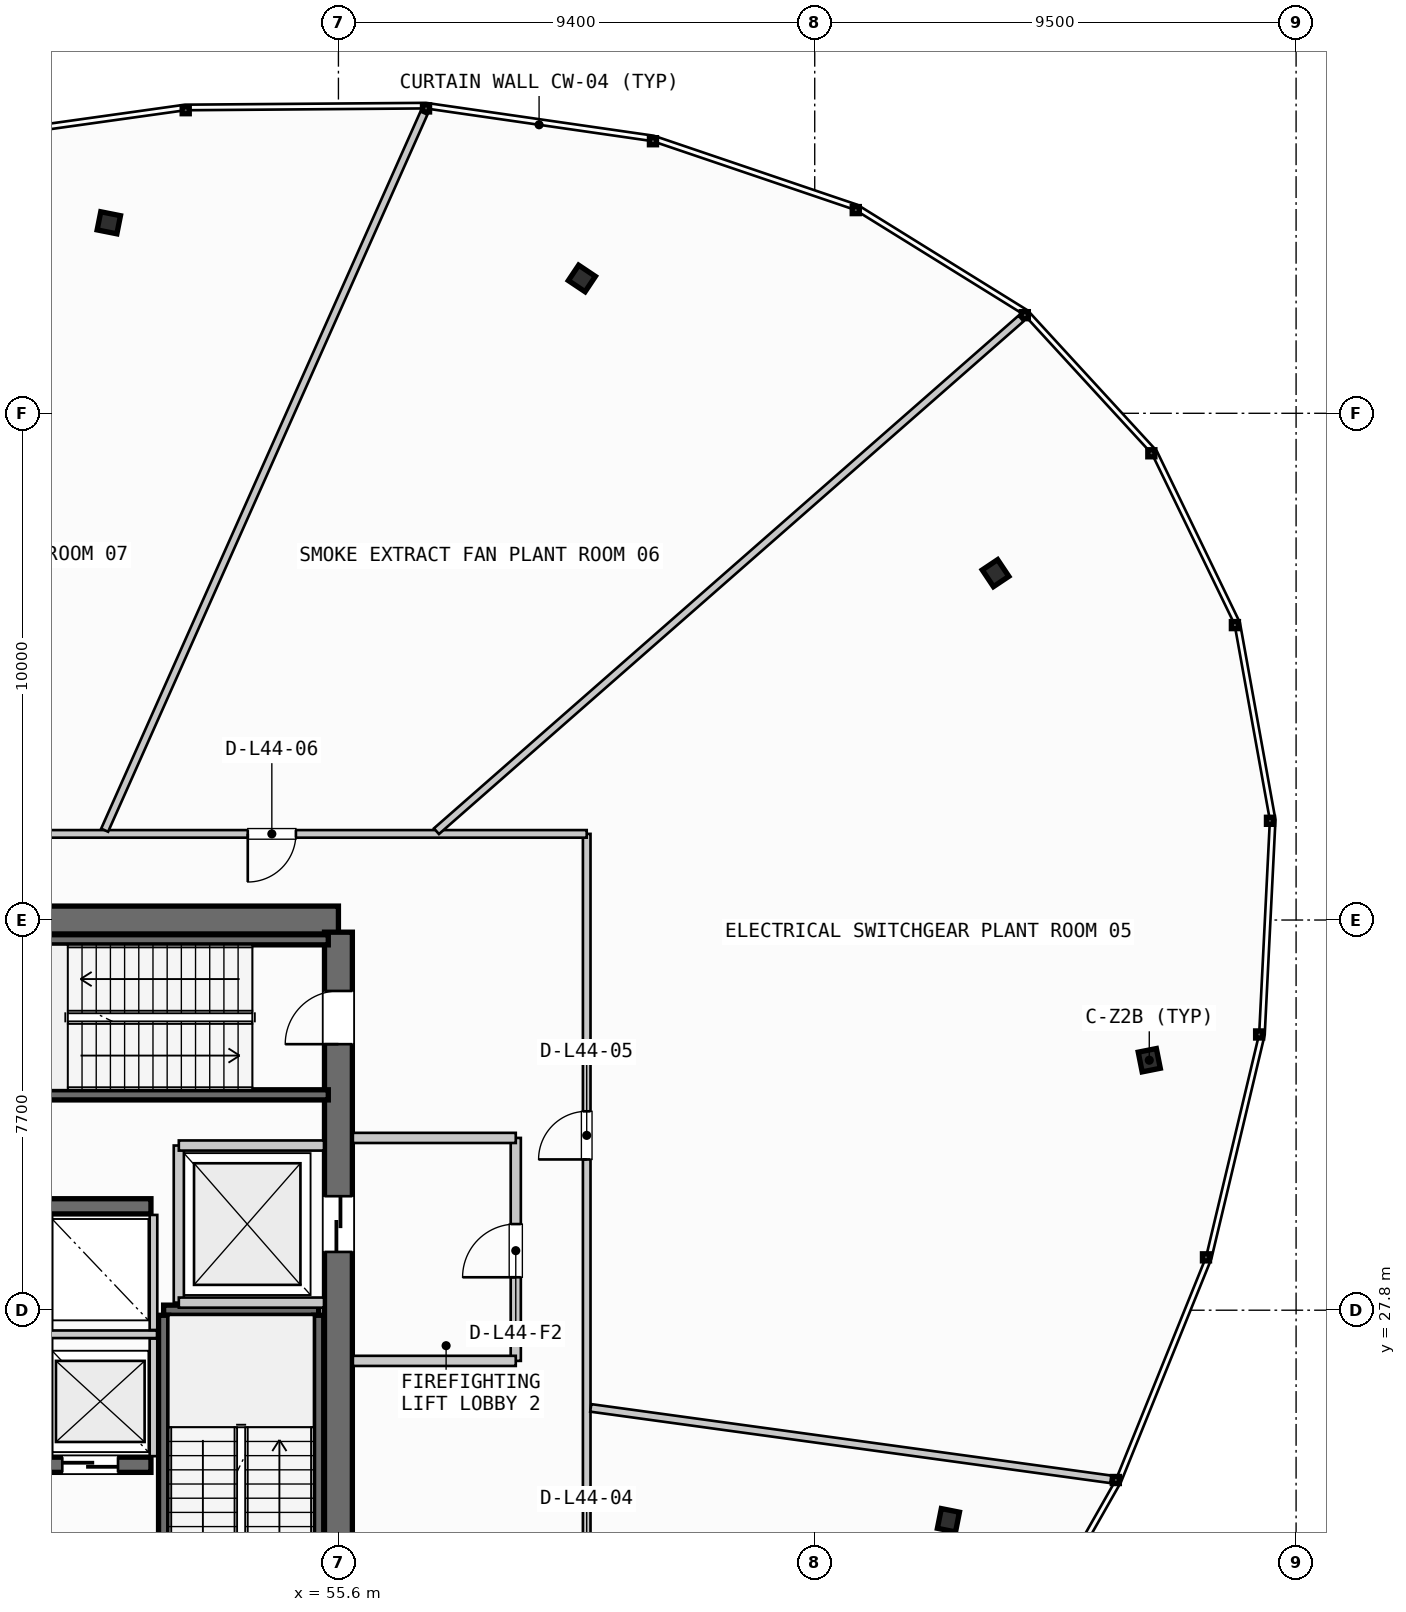
"""IFC4 building model, lengths in metres.
Left out: names, types, materials, properties, quantities, classifications, styles, units other than length and angle.
Written with IfcOpenShell. Run it as: python <this file> out.ifc"""

import sys

from ifc_helpers import new_model, si_unit, direction, frame, frame_2d, origin, origin_2d, place, context, subcontext, project, spatial, rectangle, i_section, extrude, source, transform, mapped, element, fill, save


model = new_model("IFC4")
c1 = context("Model", 3, precision=1e-05, world=origin(), true_north=direction((0.0, 1.0)))
c2 = subcontext(c1, "Body", "Model", "MODEL_VIEW")
j1 = project(units=[si_unit("LENGTHUNIT", "METRE"), si_unit("PLANEANGLEUNIT", "RADIAN")], contexts=[c1])
p1 = place(None, origin())
s1 = spatial("IfcSite", under=j1, at=p1, CompositionType="ELEMENT")
p2 = place(p1, origin())
s2 = spatial("IfcBuilding", under=s1, at=p2, CompositionType="ELEMENT")
p3 = place(p2, frame((0.0, 0.0, 171.4)))
s3 = spatial("IfcBuildingStorey", under=s2, at=p3, CompositionType="ELEMENT", Elevation=171.4)
p4 = place(p3, frame((55.6, 35.5, 0.0), z_axis=(0.0, 0.0, 1.0), x_axis=(-1.0, 0.0, 0.0)))
e1 = element("IfcWall", 1, at=p4, inside=s3, PredefinedType="SHEAR", context=c2, shape_type="SweptSolid", body=[
    extrude(rectangle(XDim=17.6, YDim=0.55, at=frame_2d((8.8, 0.0))), origin(), (0.0, 0.0, 1.0), 4.58),
])
p5 = place(p4, frame((8.05, 0.0, 0.0)))
e2 = element("IfcOpeningElement", 2, at=p5, cuts=e1, PredefinedType="OPENING", context=c2, shape_type="SweptSolid", body=[
    extrude(rectangle(XDim=1.5, YDim=2.2, at=frame_2d((0.75, 1.1))), frame((0.0, 0.285, 0.0), z_axis=(0.0, -1.0, 0.0), x_axis=(1.0, 0.0, 0.0)), (0.0, 0.0, 1.0), 0.57),
])
p6 = place(p4, frame((12.9, 0.0, 0.0)))
e3 = element("IfcOpeningElement", 3, at=p6, cuts=e1, PredefinedType="OPENING", context=c2, shape_type="SweptSolid", body=[
    extrude(rectangle(XDim=0.9, YDim=2.15, at=frame_2d((0.45, 1.075))), frame((0.0, 0.285, 0.0), z_axis=(0.0, -1.0, 0.0), x_axis=(1.0, 0.0, 0.0)), (0.0, 0.0, 1.0), 0.57),
])
p7 = place(p4, frame((10.6, 0.0, 0.0)))
e4 = element("IfcOpeningElement", 4, at=p7, cuts=e1, PredefinedType="OPENING", context=c2, shape_type="SweptSolid", body=[
    extrude(rectangle(XDim=0.95, YDim=2.15, at=frame_2d((0.475, 1.075))), frame((0.0, 0.285, 0.0), z_axis=(0.0, -1.0, 0.0), x_axis=(1.0, 0.0, 0.0)), (0.0, 0.0, 1.0), 0.57),
])
p8 = place(p3, frame((55.6, 20.34, 0.0), z_axis=(0.0, 0.0, 1.0), x_axis=(0.0, 1.0, 0.0)))
e5 = element("IfcWall", 5, at=p8, inside=s3, PredefinedType="SHEAR", context=c2, shape_type="SweptSolid", body=[
    extrude(rectangle(XDim=14.92, YDim=0.55, at=frame_2d((7.46, 0.0))), origin(), (0.0, 0.0, 1.0), 4.58),
])
p9 = place(p8, frame((12.71, 0.0, 0.0)))
e6 = element("IfcOpeningElement", 6, at=p9, cuts=e5, PredefinedType="OPENING", context=c2, shape_type="SweptSolid", body=[
    extrude(rectangle(XDim=1.05, YDim=2.15, at=frame_2d((0.525, 1.075))), frame((0.0, 0.285, 0.0), z_axis=(0.0, -1.0, 0.0), x_axis=(1.0, 0.0, 0.0)), (0.0, 0.0, 1.0), 0.57),
])
p10 = place(p8, frame((8.61, 0.0, 0.0)))
e7 = element("IfcOpeningElement", 7, at=p10, cuts=e5, PredefinedType="OPENING", context=c2, shape_type="SweptSolid", body=[
    extrude(rectangle(XDim=1.1, YDim=2.2, at=frame_2d((0.55, 1.1))), frame((0.0, 0.285, 0.0), z_axis=(0.0, -1.0, 0.0), x_axis=(1.0, 0.0, 0.0)), (0.0, 0.0, 1.0), 0.57),
])
p11 = place(p3, frame((47.65, 24.75, 0.0), z_axis=(0.0, 0.0, 1.0), x_axis=(1.0, 0.0, 0.0)))
e8 = element("IfcWall", 8, at=p11, inside=s3, PredefinedType="SHEAR", context=c2, shape_type="SweptSolid", body=[
    extrude(rectangle(XDim=4.25, YDim=0.3, at=frame_2d((2.125, 0.0))), origin(), (0.0, 0.0, 1.0), 4.58),
])
p12 = place(p11, frame((0.45, 0.0, 0.0)))
e9 = element("IfcOpeningElement", 9, at=p12, cuts=e8, PredefinedType="OPENING", context=c2, shape_type="SweptSolid", body=[
    extrude(rectangle(XDim=1.1, YDim=2.2, at=frame_2d((0.55, 1.1))), frame((0.0, 0.16, 0.0), z_axis=(0.0, -1.0, 0.0), x_axis=(1.0, 0.0, 0.0)), (0.0, 0.0, 1.0), 0.32),
])
p13 = place(p11, frame((2.5, 0.0, 0.0)))
e10 = element("IfcOpeningElement", 10, at=p13, cuts=e8, PredefinedType="OPENING", context=c2, shape_type="SweptSolid", body=[
    extrude(rectangle(XDim=1.1, YDim=2.2, at=frame_2d((0.55, 1.1))), frame((0.0, 0.16, 0.0), z_axis=(0.0, -1.0, 0.0), x_axis=(1.0, 0.0, 0.0)), (0.0, 0.0, 1.0), 0.32),
])
p14 = place(p3, frame((47.65, 29.85, 0.0), z_axis=(0.0, 0.0, 1.0), x_axis=(1.0, 0.0, 0.0)))
e11 = element("IfcWall", 11, at=p14, inside=s3, PredefinedType="SHEAR", context=c2, shape_type="SweptSolid", body=[
    extrude(rectangle(XDim=4.25, YDim=0.3, at=frame_2d((2.125, 0.0))), origin(), (0.0, 0.0, 1.0), 4.58),
])
m1 = source(origin(), c2, "Body", "SweptSolid", [
    extrude(i_section(OverallWidth=0.397, OverallDepth=0.365, WebThickness=0.028, FlangeThickness=0.044, FilletRadius=0.015, at=origin_2d()), origin(), (0.0, 0.0, 1.0), 4.58),
])
for number, where, z_axis, x_axis in (
    (12, (71.603, 32.733, 0.0), (0.0, 0.0, 1.0), (0.981, 0.195, 0.0)),
    (13, (68.569, 42.345, 0.0), (0.0, 0.0, 1.0), (0.831, 0.556, 0.0)),
    (14, (60.405, 48.161, 0.0), (0.0, 0.0, 1.0), (0.556, 0.831, 0.0)),
    (15, (51.069, 49.259, 0.0), (0.0, 0.0, 1.0), (0.195, 0.981, 0.0)),
    (16, (67.639, 23.655, 0.0), (0.0, 0.0, 1.0), (0.981, -0.195, 0.0)),
):
    element("IfcColumn", number, at=place(p3, frame(where, z_axis=z_axis, x_axis=x_axis)), inside=s3, PredefinedType="COLUMN", context=c2, shape_type="MappedRepresentation", body=[
        mapped(m1, transform((0.0, 0.0, 0.0), scale=1.0)),
    ])
p15 = place(p3, frame((52.15, 27.8, 0.0), z_axis=(0.0, 0.0, 1.0), x_axis=(1.0, 0.0, 0.0)))
e17 = element("IfcWall", 17, at=p15, inside=s3, PredefinedType="SHEAR", context=c2, shape_type="SweptSolid", body=[
    extrude(rectangle(XDim=3.06, YDim=0.2, at=frame_2d((1.53, 0.0))), origin(), (0.0, 0.0, 1.0), 4.58),
])
for number, where, z_axis, x_axis in (
    (18, (55.21, 27.7, 0.0), (0.0, 0.0, 1.0), (0.0, -1.0, 0.0)),
    (19, (52.15, 20.35, 0.0), (0.0, 0.0, 1.0), (0.0, 1.0, 0.0)),
    (20, (48.05, 35.11, 0.0), (0.0, 0.0, 1.0), (1.0, 0.0, 0.0)),
    (21, (55.4, 32.05, 0.0), (0.0, 0.0, 1.0), (-1.0, 0.0, 0.0)),
):
    element("IfcWall", number, at=place(p3, frame(where, z_axis=z_axis, x_axis=x_axis)), inside=s3, PredefinedType="SHEAR", context=c2, shape_type="SweptSolid", body=[
        extrude(rectangle(XDim=7.35, YDim=0.2, at=frame_2d((3.675, 0.0))), origin(), (0.0, 0.0, 1.0), 4.58),
    ])
p16 = place(p3, frame((52.45, 27.95, 0.0), z_axis=(0.0, 0.0, 1.0), x_axis=(0.0, 1.0, 0.0)))
e22 = element("IfcWall", 22, at=p16, inside=s3, PredefinedType="PARTITIONING", context=c2, shape_type="SweptSolid", body=[
    extrude(rectangle(XDim=3.1, YDim=0.2, at=frame_2d((1.55, 0.0))), origin(), (0.0, 0.0, 1.0), 2.355),
])
for number, where, z_axis, x_axis in (
    (23, (52.45, 27.95, 0.0), (0.0, 0.0, 1.0), (1.0, 0.0, 0.0)),
    (24, (52.45, 31.05, 0.0), (0.0, 0.0, 1.0), (1.0, 0.0, 0.0)),
):
    element("IfcWall", number, at=place(p3, frame(where, z_axis=z_axis, x_axis=x_axis)), inside=s3, PredefinedType="PARTITIONING", context=c2, shape_type="SweptSolid", body=[
        extrude(rectangle(XDim=2.865, YDim=0.2, at=frame_2d((1.433, 0.0))), origin(), (0.0, 0.0, 1.0), 2.355),
    ])
p17 = place(p3, frame((59.1, 26.8, 0.0), z_axis=(0.0, 0.0, 1.0), x_axis=(0.0, 1.0, 0.0)))
e25 = element("IfcWall", 25, at=p17, inside=s3, PredefinedType="PARTITIONING", context=c2, shape_type="SweptSolid", body=[
    extrude(rectangle(XDim=4.4, YDim=0.2, at=frame_2d((2.2, 0.0))), origin(), (0.0, 0.0, 1.0), 2.355),
])
p18 = place(p17, frame((1.65, 0.0, 0.0)))
e26 = element("IfcOpeningElement", 26, at=p18, cuts=e25, PredefinedType="OPENING", context=c2, shape_type="SweptSolid", body=[
    extrude(rectangle(XDim=1.05, YDim=2.15, at=frame_2d((0.525, 1.075))), frame((0.0, 0.11, 0.0), z_axis=(0.0, -1.0, 0.0), x_axis=(1.0, 0.0, 0.0)), (0.0, 0.0, 1.0), 0.22),
])
for number, where, z_axis, x_axis in (
    (27, (55.885, 26.8, 0.0), (0.0, 0.0, 1.0), (1.0, 0.0, 0.0)),
    (28, (55.885, 31.2, 0.0), (0.0, 0.0, 1.0), (1.0, 0.0, 0.0)),
):
    element("IfcWall", number, at=place(p3, frame(where, z_axis=z_axis, x_axis=x_axis)), inside=s3, PredefinedType="PARTITIONING", context=c2, shape_type="SweptSolid", body=[
        extrude(rectangle(XDim=3.215, YDim=0.2, at=frame_2d((1.607, 0.0))), origin(), (0.0, 0.0, 1.0), 2.355),
    ])
p19 = place(p3, frame((47.7, 27.325, 0.0), z_axis=(0.0, 0.0, 1.0), x_axis=(1.0, 0.0, 0.0)))
e29 = element("IfcWall", 29, at=p19, inside=s3, PredefinedType="PARTITIONING", context=c2, shape_type="SweptSolid", body=[
    extrude(rectangle(XDim=4.32, YDim=0.15, at=frame_2d((2.16, 0.0))), origin(), (0.0, 0.0, 1.0), 2.355),
])
p20 = place(p3, frame((51.95, 24.92, 0.0), z_axis=(0.0, 0.0, 1.0), x_axis=(0.0, 1.0, 0.0)))
e30 = element("IfcWall", 30, at=p20, inside=s3, PredefinedType="PARTITIONING", context=c2, shape_type="SweptSolid", body=[
    extrude(rectangle(XDim=2.32, YDim=0.15, at=frame_2d((1.16, 0.0))), origin(), (0.0, 0.0, 1.0), 2.355),
])
p21 = place(p3, frame((51.95, 27.41, 0.0), z_axis=(0.0, 0.0, 1.0), x_axis=(0.0, 1.0, 0.0)))
e31 = element("IfcWall", 31, at=p21, inside=s3, PredefinedType="PARTITIONING", context=c2, shape_type="SweptSolid", body=[
    extrude(rectangle(XDim=2.27, YDim=0.15, at=frame_2d((1.135, 0.0))), origin(), (0.0, 0.0, 1.0), 2.355),
])
p22 = place(p3, frame((60.5, 18.4, 0.0), z_axis=(0.0, 0.0, 1.0), x_axis=(0.0, 1.0, 0.0)))
e32 = element("IfcWall", 32, at=p22, inside=s3, PredefinedType="PARTITIONING", context=c2, shape_type="SweptSolid", body=[
    extrude(rectangle(XDim=18.8, YDim=0.15, at=frame_2d((9.4, 0.0))), origin(), (0.0, 0.0, 1.0), 2.355),
])
p23 = place(p22, frame((3.556, 0.0, 0.0)))
e33 = element("IfcOpeningElement", 33, at=p23, cuts=e32, PredefinedType="OPENING", context=c2, shape_type="SweptSolid", body=[
    extrude(rectangle(XDim=0.95, YDim=2.15, at=frame_2d((0.475, 1.075))), frame((0.0, 0.085, 0.0), z_axis=(0.0, -1.0, 0.0), x_axis=(1.0, 0.0, 0.0)), (0.0, 0.0, 1.0), 0.17),
])
p24 = place(p22, frame((12.375, 0.0, 0.0)))
e34 = element("IfcOpeningElement", 34, at=p24, cuts=e32, PredefinedType="OPENING", context=c2, shape_type="SweptSolid", body=[
    extrude(rectangle(XDim=0.95, YDim=2.15, at=frame_2d((0.475, 1.075))), frame((0.0, 0.085, 0.0), z_axis=(0.0, -1.0, 0.0), x_axis=(1.0, 0.0, 0.0)), (0.0, 0.0, 1.0), 0.17),
])
p25 = place(p3, frame((60.5, 37.2, 0.0), z_axis=(0.0, 0.0, 1.0), x_axis=(-1.0, 0.0, 0.0)))
e35 = element("IfcWall", 35, at=p25, inside=s3, PredefinedType="PARTITIONING", context=c2, shape_type="SweptSolid", body=[
    extrude(rectangle(XDim=27.4, YDim=0.15, at=frame_2d((13.7, 0.0))), origin(), (0.0, 0.0, 1.0), 2.355),
])
p26 = place(p25, frame((5.739, 0.0, 0.0)))
e36 = element("IfcOpeningElement", 36, at=p26, cuts=e35, PredefinedType="OPENING", context=c2, shape_type="SweptSolid", body=[
    extrude(rectangle(XDim=0.95, YDim=2.15, at=frame_2d((0.475, 1.075))), frame((0.0, 0.085, 0.0), z_axis=(0.0, -1.0, 0.0), x_axis=(1.0, 0.0, 0.0)), (0.0, 0.0, 1.0), 0.17),
])
p27 = place(p25, frame((13.038, 0.0, 0.0)))
e37 = element("IfcOpeningElement", 37, at=p27, cuts=e35, PredefinedType="OPENING", context=c2, shape_type="SweptSolid", body=[
    extrude(rectangle(XDim=0.95, YDim=2.15, at=frame_2d((0.475, 1.075))), frame((0.0, 0.085, 0.0), z_axis=(0.0, -1.0, 0.0), x_axis=(1.0, 0.0, 0.0)), (0.0, 0.0, 1.0), 0.17),
])
p28 = place(p25, frame((20.105, 0.0, 0.0)))
e38 = element("IfcOpeningElement", 38, at=p28, cuts=e35, PredefinedType="OPENING", context=c2, shape_type="SweptSolid", body=[
    extrude(rectangle(XDim=0.95, YDim=2.15, at=frame_2d((0.475, 1.075))), frame((0.0, 0.085, 0.0), z_axis=(0.0, -1.0, 0.0), x_axis=(1.0, 0.0, 0.0)), (0.0, 0.0, 1.0), 0.17),
])
p29 = place(p3, frame((60.579, 25.872, 0.0), z_axis=(0.0, 0.0, 1.0), x_axis=(0.990702675866, -0.136044875066, 0.0)))
e39 = element("IfcWall", 39, at=p29, inside=s3, PredefinedType="PARTITIONING", context=c2, shape_type="SweptSolid", body=[
    extrude(rectangle(XDim=10.36, YDim=0.15, at=frame_2d((5.18, 0.0))), origin(), (0.0, 0.0, 1.0), 2.355),
])
p30 = place(p3, frame((57.534, 37.253, 0.0), z_axis=(0.0, 0.0, 1.0), x_axis=(0.751830096588, 0.659356888085, 0.0)))
e40 = element("IfcWall", 40, at=p30, inside=s3, PredefinedType="PARTITIONING", context=c2, shape_type="SweptSolid", body=[
    extrude(rectangle(XDim=15.344, YDim=0.15, at=frame_2d((7.672, 0.0))), origin(), (0.0, 0.0, 1.0), 2.355),
])
p31 = place(p3, frame((50.986, 37.273, 0.0), z_axis=(0.0, 0.0, 1.0), x_axis=(0.406800747022, 0.913516914032, 0.0)))
e41 = element("IfcWall", 41, at=p31, inside=s3, PredefinedType="PARTITIONING", context=c2, shape_type="SweptSolid", body=[
    extrude(rectangle(XDim=15.492, YDim=0.15, at=frame_2d((7.746, 0.0))), origin(), (0.0, 0.0, 1.0), 2.355),
])
m2 = source(origin(), c2, "Body", "SweptSolid", [
    extrude(rectangle(XDim=1.05, YDim=2.15, at=frame_2d((0.525, 1.075))), frame((0.0, 0.025, 0.0), z_axis=(0.0, -1.0, 0.0), x_axis=(1.0, 0.0, 0.0)), (0.0, 0.0, 1.0), 0.05),
])
p32 = place(p9, origin())
e42 = element("IfcDoor", 42, at=p32, inside=s3, OperationType="SINGLE_SWING_LEFT", PredefinedType="DOOR", context=c2, shape_type="MappedRepresentation", body=[
    mapped(m2, transform((0.0, 0.0, 0.0), scale=1.0)),
])
fill(e6, e42)
m3 = source(origin(), c2, "Body", "SweptSolid", [
    extrude(rectangle(XDim=1.1, YDim=2.2, at=frame_2d((0.55, 1.1))), frame((0.0, 0.025, 0.0), z_axis=(0.0, -1.0, 0.0), x_axis=(1.0, 0.0, 0.0)), (0.0, 0.0, 1.0), 0.05),
])
p33 = place(p10, origin())
e43 = element("IfcDoor", 43, at=p33, inside=s3, OperationType="SLIDING_TO_RIGHT", PredefinedType="DOOR", context=c2, shape_type="MappedRepresentation", body=[
    mapped(m3, transform((0.0, 0.0, 0.0), scale=1.0)),
])
fill(e7, e43)
p34 = place(p13, origin())
e44 = element("IfcDoor", 44, at=p34, inside=s3, OperationType="SLIDING_TO_RIGHT", PredefinedType="DOOR", context=c2, shape_type="MappedRepresentation", body=[
    mapped(m3, transform((0.0, 0.0, 0.0), scale=1.0)),
])
fill(e10, e44)
p35 = place(p18, origin())
e45 = element("IfcDoor", 45, at=p35, inside=s3, OperationType="SINGLE_SWING_LEFT", PredefinedType="DOOR", context=c2, shape_type="MappedRepresentation", body=[
    mapped(m2, transform((0.0, 0.0, 0.0), scale=1.0)),
])
fill(e26, e45)
m4 = source(origin(), c2, "Body", "SweptSolid", [
    extrude(rectangle(XDim=0.95, YDim=2.15, at=frame_2d((0.475, 1.075))), frame((0.0, 0.025, 0.0), z_axis=(0.0, -1.0, 0.0), x_axis=(1.0, 0.0, 0.0)), (0.0, 0.0, 1.0), 0.05),
])
p36 = place(p24, origin())
e46 = element("IfcDoor", 46, at=p36, inside=s3, OperationType="SINGLE_SWING_LEFT", PredefinedType="DOOR", context=c2, shape_type="MappedRepresentation", body=[
    mapped(m4, transform((0.0, 0.0, 0.0), scale=1.0)),
])
fill(e34, e46)
p37 = place(p26, origin())
e47 = element("IfcDoor", 47, at=p37, inside=s3, OperationType="SINGLE_SWING_RIGHT", PredefinedType="DOOR", context=c2, shape_type="MappedRepresentation", body=[
    mapped(m4, transform((0.0, 0.0, 0.0), scale=1.0)),
])
fill(e36, e47)
save(model, sys.argv[1])
